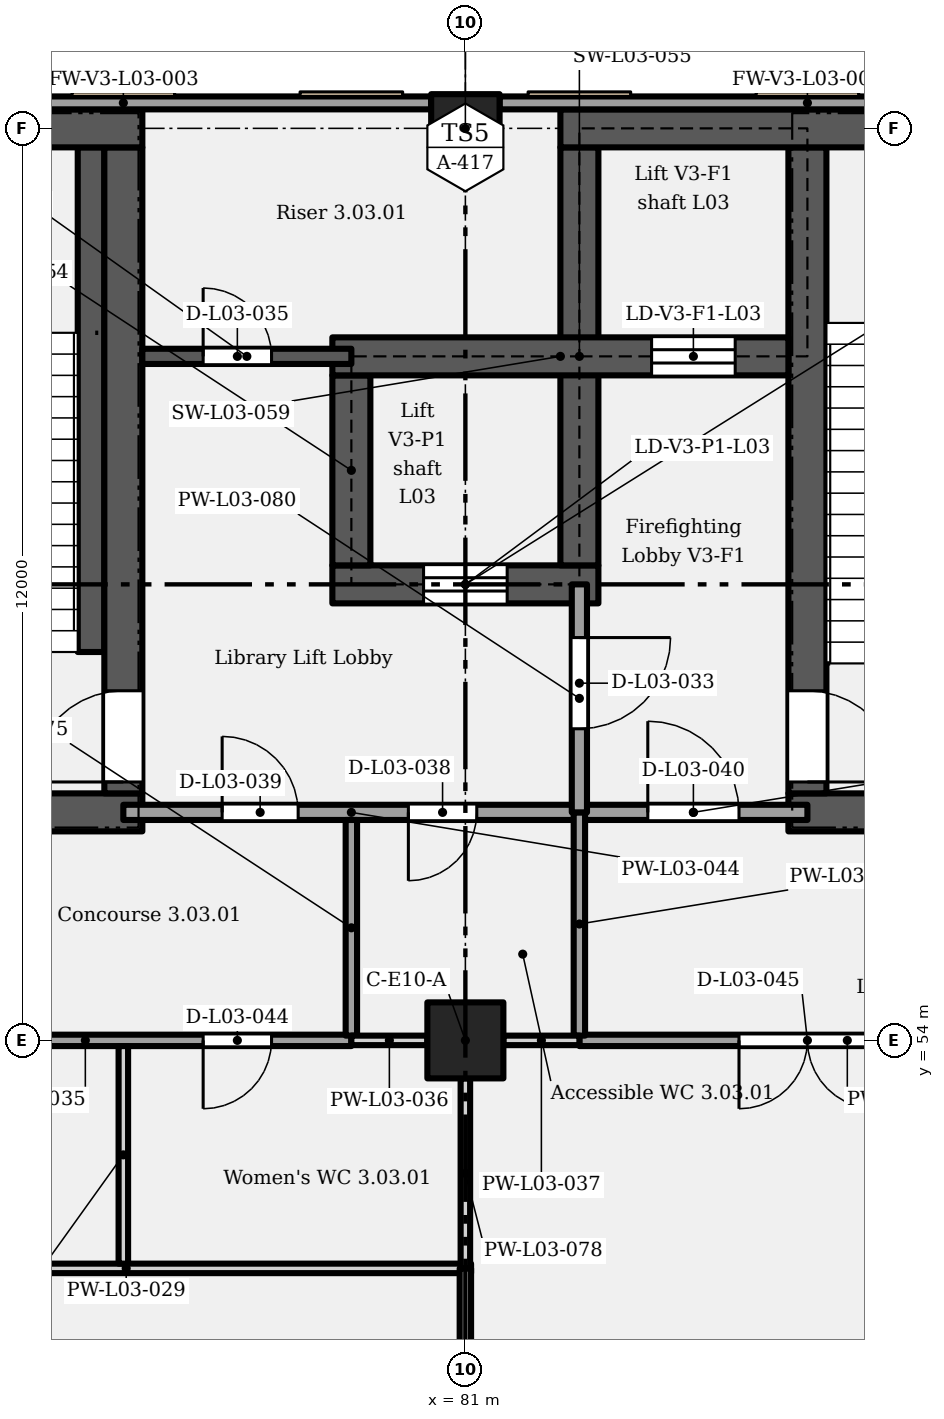
"""IFC4 building model, lengths in metres.
Left out: names, types, materials, properties, quantities, classifications, styles, units other than length and angle.
Written with IfcOpenShell. Run it as: python <this file> out.ifc"""

import sys

from ifc_helpers import new_model, si_unit, direction, frame, frame_2d, origin, origin_2d, place, context, subcontext, project, spatial, rectangle, extrude, element, fill, save


model = new_model("IFC4")
c1 = context("Model", 3, precision=1e-05, world=origin(), true_north=direction((0.0, 1.0)))
c2 = subcontext(c1, "Body", "Model", "MODEL_VIEW")
j1 = project(units=[si_unit("LENGTHUNIT", "METRE"), si_unit("PLANEANGLEUNIT", "RADIAN")], contexts=[c1])
p1 = place(None, origin())
s1 = spatial("IfcSite", under=j1, at=p1, CompositionType="ELEMENT")
p2 = place(p1, origin())
s2 = spatial("IfcBuilding", under=s1, at=p2, CompositionType="ELEMENT")
p3 = place(p2, frame((0.0, 0.0, 17.4)))
s3 = spatial("IfcBuildingStorey", under=s2, at=p3, CompositionType="ELEMENT", Elevation=17.4)
p4 = place(p3, frame((81.0, 54.0, 0.0), z_axis=(0.0, 0.0, 1.0), x_axis=(1.0, 0.0, 0.0)))
e1 = element("IfcColumn", 1, at=p4, inside=s3, PredefinedType="COLUMN", context=c2, shape_type="SweptSolid", body=[
    extrude(rectangle(XDim=1.0, YDim=1.0, at=origin_2d()), origin(), (0.0, 0.0, 1.0), 5.4),
])
p5 = place(p3, frame((81.0, 66.0, 0.0), z_axis=(0.0, 0.0, 1.0), x_axis=(1.0, 0.0, 0.0)))
e2 = element("IfcColumn", 2, at=p5, inside=s3, PredefinedType="COLUMN", context=c2, shape_type="SweptSolid", body=[
    extrude(rectangle(XDim=0.9, YDim=0.9, at=origin_2d()), origin(), (0.0, 0.0, 1.0), 5.4),
])
p6 = place(p3, frame((71.75, 57.0, 0.0), z_axis=(0.0, 0.0, 1.0), x_axis=(1.0, 0.0, 0.0)))
e3 = element("IfcWall", 3, at=p6, inside=s3, PredefinedType="SHEAR", context=c2, shape_type="SweptSolid", body=[
    extrude(rectangle(XDim=5.0, YDim=0.5, at=frame_2d((2.5, 0.0))), origin(), (0.0, 0.0, 1.0), 5.15),
])
p7 = place(p6, frame((1.9, 0.0, 0.0)))
e4 = element("IfcOpeningElement", 4, at=p7, cuts=e3, PredefinedType="OPENING", context=c2, shape_type="SweptSolid", body=[
    extrude(rectangle(XDim=1.2, YDim=2.1, at=frame_2d((0.6, 1.05))), frame((0.0, 0.26, 0.0), z_axis=(0.0, -1.0, 0.0), x_axis=(1.0, 0.0, 0.0)), (0.0, 0.0, 1.0), 0.52),
])
p8 = place(p3, frame((85.25, 57.0, 0.0), z_axis=(0.0, 0.0, 1.0), x_axis=(1.0, 0.0, 0.0)))
e5 = element("IfcWall", 5, at=p8, inside=s3, PredefinedType="SHEAR", context=c2, shape_type="SweptSolid", body=[
    extrude(rectangle(XDim=5.0, YDim=0.5, at=frame_2d((2.5, 0.0))), origin(), (0.0, 0.0, 1.0), 5.15),
])
p9 = place(p8, frame((1.9, 0.0, 0.0)))
e6 = element("IfcOpeningElement", 6, at=p9, cuts=e5, PredefinedType="OPENING", context=c2, shape_type="SweptSolid", body=[
    extrude(rectangle(XDim=1.2, YDim=2.1, at=frame_2d((0.6, 1.05))), frame((0.0, 0.26, 0.0), z_axis=(0.0, -1.0, 0.0), x_axis=(1.0, 0.0, 0.0)), (0.0, 0.0, 1.0), 0.52),
])
p10 = place(p3, frame((76.5, 57.25, 0.0), z_axis=(0.0, 0.0, 1.0), x_axis=(0.0, 1.0, 0.0)))
e7 = element("IfcWall", 7, at=p10, inside=s3, PredefinedType="SHEAR", context=c2, shape_type="SweptSolid", body=[
    extrude(rectangle(XDim=8.5, YDim=0.5, at=frame_2d((4.25, 0.0))), origin(), (0.0, 0.0, 1.0), 5.15),
])
p11 = place(p10, frame((0.15, 0.0, 0.0)))
e8 = element("IfcOpeningElement", 8, at=p11, cuts=e7, PredefinedType="OPENING", context=c2, shape_type="SweptSolid", body=[
    extrude(rectangle(XDim=1.2, YDim=2.1, at=frame_2d((0.6, 1.05))), frame((0.0, 0.26, 0.0), z_axis=(0.0, -1.0, 0.0), x_axis=(1.0, 0.0, 0.0)), (0.0, 0.0, 1.0), 0.52),
])
p12 = place(p3, frame((85.5, 57.25, 0.0), z_axis=(0.0, 0.0, 1.0), x_axis=(0.0, 1.0, 0.0)))
e9 = element("IfcWall", 9, at=p12, inside=s3, PredefinedType="SHEAR", context=c2, shape_type="SweptSolid", body=[
    extrude(rectangle(XDim=8.5, YDim=0.5, at=frame_2d((4.25, 0.0))), origin(), (0.0, 0.0, 1.0), 5.15),
])
p13 = place(p12, frame((1.35, 0.0, 0.0), z_axis=(0.0, 0.0, 1.0), x_axis=(-1.0, 0.0, 0.0)))
e10 = element("IfcOpeningElement", 10, at=p13, cuts=e9, PredefinedType="OPENING", context=c2, shape_type="SweptSolid", body=[
    extrude(rectangle(XDim=1.2, YDim=2.1, at=frame_2d((0.6, 1.05))), frame((0.0, 0.26, 0.0), z_axis=(0.0, -1.0, 0.0), x_axis=(1.0, 0.0, 0.0)), (0.0, 0.0, 1.0), 0.52),
])
p14 = place(p3, frame((79.25, 60.0, 0.0), z_axis=(0.0, 0.0, 1.0), x_axis=(1.0, 0.0, 0.0)))
e11 = element("IfcWall", 11, at=p14, inside=s3, PredefinedType="SHEAR", context=c2, shape_type="SweptSolid", body=[
    extrude(rectangle(XDim=3.5, YDim=0.5, at=frame_2d((1.75, 0.0))), origin(), (0.0, 0.0, 1.0), 5.15),
])
p15 = place(p14, frame((1.2, 0.0, 0.0)))
e12 = element("IfcOpeningElement", 12, at=p15, cuts=e11, PredefinedType="OPENING", context=c2, shape_type="SweptSolid", body=[
    extrude(rectangle(XDim=1.1, YDim=2.1, at=frame_2d((0.55, 1.05))), frame((0.0, 0.26, 0.0), z_axis=(0.0, -1.0, 0.0), x_axis=(1.0, 0.0, 0.0)), (0.0, 0.0, 1.0), 0.52),
])
p16 = place(p3, frame((79.5, 60.25, 0.0), z_axis=(0.0, 0.0, 1.0), x_axis=(0.0, 1.0, 0.0)))
e13 = element("IfcWall", 13, at=p16, inside=s3, PredefinedType="SHEAR", context=c2, shape_type="SweptSolid", body=[
    extrude(rectangle(XDim=2.5, YDim=0.5, at=frame_2d((1.25, 0.0))), origin(), (0.0, 0.0, 1.0), 5.15),
])
p17 = place(p3, frame((82.5, 60.25, 0.0), z_axis=(0.0, 0.0, 1.0), x_axis=(0.0, 1.0, 0.0)))
e14 = element("IfcWall", 14, at=p17, inside=s3, PredefinedType="SHEAR", context=c2, shape_type="SweptSolid", body=[
    extrude(rectangle(XDim=5.5, YDim=0.5, at=frame_2d((2.75, 0.0))), origin(), (0.0, 0.0, 1.0), 5.15),
])
p18 = place(p3, frame((79.25, 63.0, 0.0), z_axis=(0.0, 0.0, 1.0), x_axis=(1.0, 0.0, 0.0)))
e15 = element("IfcWall", 15, at=p18, inside=s3, PredefinedType="SHEAR", context=c2, shape_type="SweptSolid", body=[
    extrude(rectangle(XDim=6.0, YDim=0.5, at=frame_2d((3.0, 0.0))), origin(), (0.0, 0.0, 1.0), 5.15),
])
p19 = place(p18, frame((4.2, 0.0, 0.0)))
e16 = element("IfcOpeningElement", 16, at=p19, cuts=e15, PredefinedType="OPENING", context=c2, shape_type="SweptSolid", body=[
    extrude(rectangle(XDim=1.1, YDim=2.1, at=frame_2d((0.55, 1.05))), frame((0.0, 0.26, 0.0), z_axis=(0.0, -1.0, 0.0), x_axis=(1.0, 0.0, 0.0)), (0.0, 0.0, 1.0), 0.52),
])
p20 = place(p3, frame((72.45, 66.0, 0.0), z_axis=(0.0, 0.0, 1.0), x_axis=(1.0, 0.0, 0.0)))
e17 = element("IfcWall", 17, at=p20, inside=s3, PredefinedType="SHEAR", context=c2, shape_type="SweptSolid", body=[
    extrude(rectangle(XDim=4.3, YDim=0.5, at=frame_2d((2.15, 0.0))), origin(), (0.0, 0.0, 1.0), 5.15),
])
p21 = place(p3, frame((82.25, 66.0, 0.0), z_axis=(0.0, 0.0, 1.0), x_axis=(1.0, 0.0, 0.0)))
e18 = element("IfcWall", 18, at=p21, inside=s3, PredefinedType="SHEAR", context=c2, shape_type="SweptSolid", body=[
    extrude(rectangle(XDim=7.3, YDim=0.5, at=frame_2d((3.65, 0.0))), origin(), (0.0, 0.0, 1.0), 5.15),
])
for number, where, z_axis, x_axis in (
    (19, (72.45, 66.335, 0.0), (0.0, 0.0, 1.0), (1.0, 0.0, 0.0)),
    (20, (81.45, 66.335, 0.0), (0.0, 0.0, 1.0), (1.0, 0.0, 0.0)),
):
    element("IfcWall", number, at=place(p3, frame(where, z_axis=z_axis, x_axis=x_axis)), inside=s3, PredefinedType="SOLIDWALL", context=c2, shape_type="SweptSolid", body=[
        extrude(rectangle(XDim=8.1, YDim=0.17, at=frame_2d((4.05, 0.0))), origin(), (0.0, 0.0, 1.0), 5.15),
    ])
p22 = place(p3, frame((72.0, 51.0, 0.0), z_axis=(0.0, 0.0, 1.0), x_axis=(1.0, 0.0, 0.0)))
e21 = element("IfcWall", 21, at=p22, inside=s3, PredefinedType="PARTITIONING", context=c2, shape_type="SweptSolid", body=[
    extrude(rectangle(XDim=9.075, YDim=0.125, at=frame_2d((4.538, 0.0))), origin(), (0.0, 0.0, 1.0), 5.15),
])
p23 = place(p3, frame((72.5, 54.0, 0.0), z_axis=(0.0, 0.0, 1.0), x_axis=(1.0, 0.0, 0.0)))
e22 = element("IfcWall", 22, at=p23, inside=s3, PredefinedType="PARTITIONING", context=c2, shape_type="SweptSolid", body=[
    extrude(rectangle(XDim=7.0, YDim=0.15, at=frame_2d((3.5, 0.0))), origin(), (0.0, 0.0, 1.0), 4.4),
])
p24 = place(p23, frame((2.2, 0.0, 0.0), z_axis=(0.0, 0.0, 1.0), x_axis=(-1.0, 0.0, 0.0)))
e23 = element("IfcOpeningElement", 23, at=p24, cuts=e22, PredefinedType="OPENING", context=c2, shape_type="SweptSolid", body=[
    extrude(rectangle(XDim=0.9, YDim=2.1, at=frame_2d((0.45, 1.05))), frame((0.0, 0.085, 0.0), z_axis=(0.0, -1.0, 0.0), x_axis=(1.0, 0.0, 0.0)), (0.0, 0.0, 1.0), 0.17),
])
p25 = place(p23, frame((5.95, 0.0, 0.0), z_axis=(0.0, 0.0, 1.0), x_axis=(-1.0, 0.0, 0.0)))
e24 = element("IfcOpeningElement", 24, at=p25, cuts=e22, PredefinedType="OPENING", context=c2, shape_type="SweptSolid", body=[
    extrude(rectangle(XDim=0.9, YDim=2.1, at=frame_2d((0.45, 1.05))), frame((0.0, 0.085, 0.0), z_axis=(0.0, -1.0, 0.0), x_axis=(1.0, 0.0, 0.0)), (0.0, 0.0, 1.0), 0.17),
])
for number, where, z_axis, x_axis in (
    (25, (79.5, 54.0, 0.0), (0.0, 0.0, 1.0), (1.0, 0.0, 0.0)),
    (26, (81.5, 54.0, 0.0), (0.0, 0.0, 1.0), (1.0, 0.0, 0.0)),
):
    element("IfcWall", number, at=place(p3, frame(where, z_axis=z_axis, x_axis=x_axis)), inside=s3, PredefinedType="PARTITIONING", context=c2, shape_type="SweptSolid", body=[
        extrude(rectangle(XDim=1.0, YDim=0.125, at=frame_2d((0.5, 0.0))), origin(), (0.0, 0.0, 1.0), 4.4),
    ])
p26 = place(p3, frame((82.5, 54.0, 0.0), z_axis=(0.0, 0.0, 1.0), x_axis=(1.0, 0.0, 0.0)))
e27 = element("IfcWall", 27, at=p26, inside=s3, PredefinedType="PARTITIONING", context=c2, shape_type="SweptSolid", body=[
    extrude(rectangle(XDim=7.05, YDim=0.15, at=frame_2d((3.525, 0.0))), origin(), (0.0, 0.0, 1.0), 4.4),
])
p27 = place(p26, frame((3.9, 0.0, 0.0), z_axis=(0.0, 0.0, 1.0), x_axis=(-1.0, 0.0, 0.0)))
e28 = element("IfcOpeningElement", 28, at=p27, cuts=e27, PredefinedType="OPENING", context=c2, shape_type="SweptSolid", body=[
    extrude(rectangle(XDim=1.8, YDim=2.4, at=frame_2d((0.9, 1.2))), frame((0.0, 0.085, 0.0), z_axis=(0.0, -1.0, 0.0), x_axis=(1.0, 0.0, 0.0)), (0.0, 0.0, 1.0), 0.17),
])
p28 = place(p3, frame((76.5, 57.0, 0.0), z_axis=(0.0, 0.0, 1.0), x_axis=(1.0, 0.0, 0.0)))
e29 = element("IfcWall", 29, at=p28, inside=s3, PredefinedType="PARTITIONING", context=c2, shape_type="SweptSolid", body=[
    extrude(rectangle(XDim=6.0, YDim=0.2, at=frame_2d((3.0, 0.0))), origin(), (0.0, 0.0, 1.0), 5.15),
])
p29 = place(p28, frame((4.65, 0.0, 0.0), z_axis=(0.0, 0.0, 1.0), x_axis=(-1.0, 0.0, 0.0)))
e30 = element("IfcOpeningElement", 30, at=p29, cuts=e29, PredefinedType="OPENING", context=c2, shape_type="SweptSolid", body=[
    extrude(rectangle(XDim=0.9, YDim=2.1, at=frame_2d((0.45, 1.05))), frame((0.0, 0.11, 0.0), z_axis=(0.0, -1.0, 0.0), x_axis=(1.0, 0.0, 0.0)), (0.0, 0.0, 1.0), 0.22),
])
p30 = place(p28, frame((1.3, 0.0, 0.0)))
e31 = element("IfcOpeningElement", 31, at=p30, cuts=e29, PredefinedType="OPENING", context=c2, shape_type="SweptSolid", body=[
    extrude(rectangle(XDim=1.0, YDim=2.1, at=frame_2d((0.5, 1.05))), frame((0.0, 0.11, 0.0), z_axis=(0.0, -1.0, 0.0), x_axis=(1.0, 0.0, 0.0)), (0.0, 0.0, 1.0), 0.22),
])
p31 = place(p3, frame((82.5, 57.0, 0.0), z_axis=(0.0, 0.0, 1.0), x_axis=(1.0, 0.0, 0.0)))
e32 = element("IfcWall", 32, at=p31, inside=s3, PredefinedType="PARTITIONING", context=c2, shape_type="SweptSolid", body=[
    extrude(rectangle(XDim=3.0, YDim=0.2, at=frame_2d((1.5, 0.0))), origin(), (0.0, 0.0, 1.0), 5.15),
])
p32 = place(p31, frame((0.9, 0.0, 0.0)))
e33 = element("IfcOpeningElement", 33, at=p32, cuts=e32, PredefinedType="OPENING", context=c2, shape_type="SweptSolid", body=[
    extrude(rectangle(XDim=1.2, YDim=2.1, at=frame_2d((0.6, 1.05))), frame((0.0, 0.11, 0.0), z_axis=(0.0, -1.0, 0.0), x_axis=(1.0, 0.0, 0.0)), (0.0, 0.0, 1.0), 0.22),
])
p33 = place(p3, frame((76.75, 63.0, 0.0), z_axis=(0.0, 0.0, 1.0), x_axis=(1.0, 0.0, 0.0)))
e34 = element("IfcWall", 34, at=p33, inside=s3, PredefinedType="SHEAR", context=c2, shape_type="SweptSolid", body=[
    extrude(rectangle(XDim=2.75, YDim=0.2, at=frame_2d((1.375, 0.0))), origin(), (0.0, 0.0, 1.0), 5.15),
])
p34 = place(p33, frame((0.8, 0.0, 0.0)))
e35 = element("IfcOpeningElement", 35, at=p34, cuts=e34, PredefinedType="OPENING", context=c2, shape_type="SweptSolid", body=[
    extrude(rectangle(XDim=0.9, YDim=2.0, at=frame_2d((0.45, 1.0))), frame((0.0, 0.11, 0.0), z_axis=(0.0, -1.0, 0.0), x_axis=(1.0, 0.0, 0.0)), (0.0, 0.0, 1.0), 0.22),
])
p35 = place(p3, frame((76.5, 51.062, 0.0), z_axis=(0.0, 0.0, 1.0), x_axis=(0.0, 1.0, 0.0)))
e36 = element("IfcWall", 36, at=p35, inside=s3, PredefinedType="PARTITIONING", context=c2, shape_type="SweptSolid", body=[
    extrude(rectangle(XDim=2.863, YDim=0.125, at=frame_2d((1.431, 0.0))), origin(), (0.0, 0.0, 1.0), 5.15),
])
p36 = place(p3, frame((79.5, 54.062, 0.0), z_axis=(0.0, 0.0, 1.0), x_axis=(0.0, 1.0, 0.0)))
e37 = element("IfcWall", 37, at=p36, inside=s3, PredefinedType="PARTITIONING", context=c2, shape_type="SweptSolid", body=[
    extrude(rectangle(XDim=2.837, YDim=0.15, at=frame_2d((1.419, 0.0))), origin(), (0.0, 0.0, 1.0), 5.15),
])
p37 = place(p3, frame((81.0, 45.0, 0.0), z_axis=(0.0, 0.0, 1.0), x_axis=(0.0, 1.0, 0.0)))
e38 = element("IfcWall", 38, at=p37, inside=s3, PredefinedType="PARTITIONING", context=c2, shape_type="SweptSolid", body=[
    extrude(rectangle(XDim=6.0, YDim=0.15, at=frame_2d((3.0, 0.0))), origin(), (0.0, 0.0, 1.0), 4.2),
])
p38 = place(p37, frame((3.6, 0.0, 0.0), z_axis=(0.0, 0.0, 1.0), x_axis=(-1.0, 0.0, 0.0)))
e39 = element("IfcOpeningElement", 39, at=p38, cuts=e38, PredefinedType="OPENING", context=c2, shape_type="SweptSolid", body=[
    extrude(rectangle(XDim=1.2, YDim=2.4, at=frame_2d((0.6, 1.2))), frame((0.0, 0.085, 0.0), z_axis=(0.0, -1.0, 0.0), x_axis=(1.0, 0.0, 0.0)), (0.0, 0.0, 1.0), 0.17),
])
p39 = place(p3, frame((81.0, 51.0, 0.0), z_axis=(0.0, 0.0, 1.0), x_axis=(0.0, 1.0, 0.0)))
e40 = element("IfcWall", 40, at=p39, inside=s3, PredefinedType="PARTITIONING", context=c2, shape_type="SweptSolid", body=[
    extrude(rectangle(XDim=2.5, YDim=0.125, at=frame_2d((1.25, 0.0))), origin(), (0.0, 0.0, 1.0), 4.2),
])
p40 = place(p3, frame((82.5, 54.062, 0.0), z_axis=(0.0, 0.0, 1.0), x_axis=(0.0, 1.0, 0.0)))
e41 = element("IfcWall", 41, at=p40, inside=s3, PredefinedType="PARTITIONING", context=c2, shape_type="SweptSolid", body=[
    extrude(rectangle(XDim=2.938, YDim=0.15, at=frame_2d((1.469, 0.0))), origin(), (0.0, 0.0, 1.0), 5.15),
])
p41 = place(p3, frame((82.5, 57.0, 0.0), z_axis=(0.0, 0.0, 1.0), x_axis=(0.0, 1.0, 0.0)))
e42 = element("IfcWall", 42, at=p41, inside=s3, PredefinedType="PARTITIONING", context=c2, shape_type="SweptSolid", body=[
    extrude(rectangle(XDim=3.0, YDim=0.2, at=frame_2d((1.5, 0.0))), origin(), (0.0, 0.0, 1.0), 5.15),
])
p42 = place(p41, frame((2.3, 0.0, 0.0), z_axis=(0.0, 0.0, 1.0), x_axis=(-1.0, 0.0, 0.0)))
e43 = element("IfcOpeningElement", 43, at=p42, cuts=e42, PredefinedType="OPENING", context=c2, shape_type="SweptSolid", body=[
    extrude(rectangle(XDim=1.2, YDim=2.1, at=frame_2d((0.6, 1.05))), frame((0.0, 0.11, 0.0), z_axis=(0.0, -1.0, 0.0), x_axis=(1.0, 0.0, 0.0)), (0.0, 0.0, 1.0), 0.22),
])
p43 = place(p3, frame((76.075, 59.11, 0.0), z_axis=(0.0, 0.0, 1.0), x_axis=(0.0, 1.0, 0.0)))
e44 = element("IfcWall", 44, at=p43, inside=s3, PredefinedType="SHEAR", context=c2, shape_type="SweptSolid", body=[
    extrude(rectangle(XDim=6.64, YDim=0.35, at=frame_2d((3.32, 0.0))), origin(), (0.0, 0.0, 1.0), 2.587),
])
p44 = place(p11, origin())
e45 = element("IfcDoor", 45, at=p44, inside=s3, OperationType="SINGLE_SWING_LEFT", PredefinedType="DOOR", context=c2, shape_type="SweptSolid", body=[
    extrude(rectangle(XDim=1.2, YDim=2.1, at=frame_2d((0.6, 1.05))), frame((0.0, 0.025, 0.0), z_axis=(0.0, -1.0, 0.0), x_axis=(1.0, 0.0, 0.0)), (0.0, 0.0, 1.0), 0.05),
])
fill(e8, e45)
p45 = place(p42, origin())
e46 = element("IfcDoor", 46, at=p45, inside=s3, OperationType="SINGLE_SWING_LEFT", PredefinedType="DOOR", context=c2, shape_type="SweptSolid", body=[
    extrude(rectangle(XDim=1.2, YDim=2.1, at=frame_2d((0.6, 1.05))), frame((0.0, 0.025, 0.0), z_axis=(0.0, -1.0, 0.0), x_axis=(1.0, 0.0, 0.0)), (0.0, 0.0, 1.0), 0.05),
])
fill(e43, e46)
p46 = place(p15, origin())
e47 = element("IfcDoor", 47, at=p46, inside=s3, OperationType="SLIDING_TO_LEFT", PredefinedType="DOOR", context=c2, shape_type="SweptSolid", body=[
    extrude(rectangle(XDim=1.1, YDim=2.1, at=frame_2d((0.55, 1.05))), frame((0.0, 0.025, 0.0), z_axis=(0.0, -1.0, 0.0), x_axis=(1.0, 0.0, 0.0)), (0.0, 0.0, 1.0), 0.05),
])
fill(e12, e47)
p47 = place(p34, origin())
e48 = element("IfcDoor", 48, at=p47, inside=s3, OperationType="SINGLE_SWING_LEFT", PredefinedType="DOOR", context=c2, shape_type="SweptSolid", body=[
    extrude(rectangle(XDim=0.9, YDim=2.0, at=frame_2d((0.45, 1.0))), frame((0.0, 0.025, 0.0), z_axis=(0.0, -1.0, 0.0), x_axis=(1.0, 0.0, 0.0)), (0.0, 0.0, 1.0), 0.05),
])
fill(e35, e48)
p48 = place(p19, origin())
e49 = element("IfcDoor", 49, at=p48, inside=s3, OperationType="SLIDING_TO_LEFT", PredefinedType="DOOR", context=c2, shape_type="SweptSolid", body=[
    extrude(rectangle(XDim=1.1, YDim=2.1, at=frame_2d((0.55, 1.05))), frame((0.0, 0.025, 0.0), z_axis=(0.0, -1.0, 0.0), x_axis=(1.0, 0.0, 0.0)), (0.0, 0.0, 1.0), 0.05),
])
fill(e16, e49)
p49 = place(p13, origin())
e50 = element("IfcDoor", 50, at=p49, inside=s3, OperationType="SINGLE_SWING_RIGHT", PredefinedType="DOOR", context=c2, shape_type="SweptSolid", body=[
    extrude(rectangle(XDim=1.2, YDim=2.1, at=frame_2d((0.6, 1.05))), frame((0.0, 0.025, 0.0), z_axis=(0.0, -1.0, 0.0), x_axis=(1.0, 0.0, 0.0)), (0.0, 0.0, 1.0), 0.05),
])
fill(e10, e50)
p50 = place(p29, origin())
e51 = element("IfcDoor", 51, at=p50, inside=s3, OperationType="SINGLE_SWING_RIGHT", PredefinedType="DOOR", context=c2, shape_type="SweptSolid", body=[
    extrude(rectangle(XDim=0.9, YDim=2.1, at=frame_2d((0.45, 1.05))), frame((0.0, 0.025, 0.0), z_axis=(0.0, -1.0, 0.0), x_axis=(1.0, 0.0, 0.0)), (0.0, 0.0, 1.0), 0.05),
])
fill(e30, e51)
p51 = place(p30, origin())
e52 = element("IfcDoor", 52, at=p51, inside=s3, OperationType="SINGLE_SWING_LEFT", PredefinedType="DOOR", context=c2, shape_type="SweptSolid", body=[
    extrude(rectangle(XDim=1.0, YDim=2.1, at=frame_2d((0.5, 1.05))), frame((0.0, 0.025, 0.0), z_axis=(0.0, -1.0, 0.0), x_axis=(1.0, 0.0, 0.0)), (0.0, 0.0, 1.0), 0.05),
])
fill(e31, e52)
p52 = place(p32, origin())
e53 = element("IfcDoor", 53, at=p52, inside=s3, OperationType="SINGLE_SWING_LEFT", PredefinedType="DOOR", context=c2, shape_type="SweptSolid", body=[
    extrude(rectangle(XDim=1.2, YDim=2.1, at=frame_2d((0.6, 1.05))), frame((0.0, 0.025, 0.0), z_axis=(0.0, -1.0, 0.0), x_axis=(1.0, 0.0, 0.0)), (0.0, 0.0, 1.0), 0.05),
])
fill(e33, e53)
p53 = place(p25, origin())
e54 = element("IfcDoor", 54, at=p53, inside=s3, OperationType="SINGLE_SWING_RIGHT", PredefinedType="DOOR", context=c2, shape_type="SweptSolid", body=[
    extrude(rectangle(XDim=0.9, YDim=2.1, at=frame_2d((0.45, 1.05))), frame((0.0, 0.025, 0.0), z_axis=(0.0, -1.0, 0.0), x_axis=(1.0, 0.0, 0.0)), (0.0, 0.0, 1.0), 0.05),
])
fill(e24, e54)
p54 = place(p27, origin())
e55 = element("IfcDoor", 55, at=p54, inside=s3, OperationType="DOUBLE_DOOR_SINGLE_SWING", PredefinedType="DOOR", context=c2, shape_type="SweptSolid", body=[
    extrude(rectangle(XDim=1.8, YDim=2.4, at=frame_2d((0.9, 1.2))), frame((0.0, 0.025, 0.0), z_axis=(0.0, -1.0, 0.0), x_axis=(1.0, 0.0, 0.0)), (0.0, 0.0, 1.0), 0.05),
])
fill(e28, e55)
save(model, sys.argv[1])
